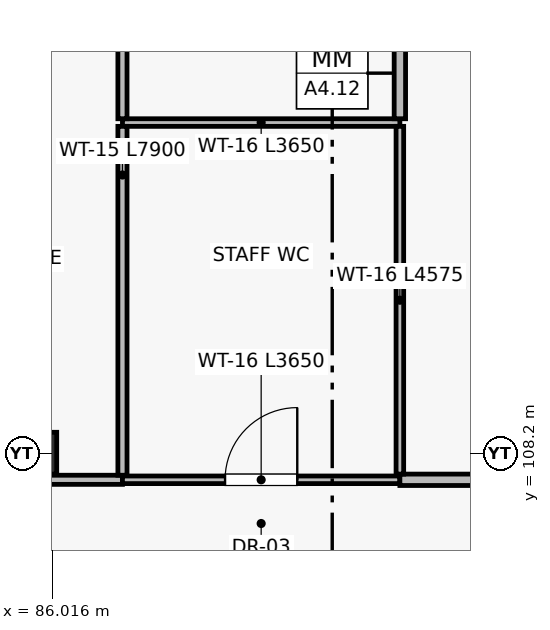
"""IFC4 building model, lengths in metres.
Left out: names, types, materials, properties, quantities, classifications, styles, units other than length and angle.
Written with IfcOpenShell. Run it as: python <this file> out.ifc"""

import sys

from ifc_helpers import new_model, si_unit, direction, frame, frame_2d, origin, origin_2d, place, context, subcontext, project, spatial, rectangle, extrude, element, fill, save


model = new_model("IFC4")
c1 = context("Model", 3, precision=1e-05, world=origin(), true_north=direction((0.0, 1.0)))
c2 = subcontext(c1, "Body", "Model", "MODEL_VIEW")
j1 = project(units=[si_unit("LENGTHUNIT", "METRE"), si_unit("PLANEANGLEUNIT", "RADIAN")], contexts=[c1])
p1 = place(None, origin())
s1 = spatial("IfcSite", under=j1, at=p1, CompositionType="ELEMENT")
p2 = place(p1, origin())
s2 = spatial("IfcBuilding", under=s1, at=p2, CompositionType="ELEMENT")
p3 = place(p2, frame((0.0, 0.0, 9.6)))
s3 = spatial("IfcBuildingStorey", under=s2, at=p3, CompositionType="ELEMENT", Elevation=9.6)
p4 = place(p3, frame((85.8, 108.2, 0.0), z_axis=(0.0, 0.0, 1.0), x_axis=(1.0, 0.0, 0.0)))
e1 = element("IfcColumn", 1, at=p4, inside=s3, PredefinedType="COLUMN", context=c2, shape_type="SweptSolid", body=[
    extrude(rectangle(XDim=0.55, YDim=0.55, at=origin_2d()), origin(), (0.0, 0.0, 1.0), 4.5),
])
p5 = place(p3, frame((83.09, 107.85, 0.0), z_axis=(0.0, 0.0, 1.0), x_axis=(1.0, 0.0, 0.0)))
e2 = element("IfcWall", 2, at=p5, inside=s3, PredefinedType="PARTITIONING", context=c2, shape_type="SweptSolid", body=[
    extrude(rectangle(XDim=3.85, YDim=0.12, at=frame_2d((1.925, 0.0))), origin(), (0.0, 0.0, 1.0), 3.74),
])
p6 = place(p5, frame((0.873, 0.0, 0.0)))
e3 = element("IfcOpeningElement", 3, at=p6, cuts=e2, PredefinedType="OPENING", context=c2, shape_type="SweptSolid", body=[
    extrude(rectangle(XDim=0.95, YDim=2.1, at=frame_2d((0.475, 1.05))), frame((0.0, 0.07, 0.0), z_axis=(0.0, -1.0, 0.0), x_axis=(1.0, 0.0, 0.0)), (0.0, 0.0, 1.0), 0.14),
])
p7 = place(p3, frame((86.94, 107.85, 0.0), z_axis=(0.0, 0.0, 1.0), x_axis=(1.0, 0.0, 0.0)))
e4 = element("IfcWall", 4, at=p7, inside=s3, PredefinedType="PARTITIONING", context=c2, shape_type="SweptSolid", body=[
    extrude(rectangle(XDim=3.65, YDim=0.1, at=frame_2d((1.825, 0.0))), origin(), (0.0, 0.0, 1.0), 3.74),
])
p8 = place(p7, frame((1.35, 0.0, 0.0)))
e5 = element("IfcOpeningElement", 5, at=p8, cuts=e4, PredefinedType="OPENING", context=c2, shape_type="SweptSolid", body=[
    extrude(rectangle(XDim=0.95, YDim=2.1, at=frame_2d((0.475, 1.05))), frame((0.0, 0.06, 0.0), z_axis=(0.0, -1.0, 0.0), x_axis=(1.0, 0.0, 0.0)), (0.0, 0.0, 1.0), 0.12),
])
p9 = place(p3, frame((86.94, 112.55, 0.0), z_axis=(0.0, 0.0, 1.0), x_axis=(1.0, 0.0, 0.0)))
e6 = element("IfcWall", 6, at=p9, inside=s3, PredefinedType="PARTITIONING", context=c2, shape_type="SweptSolid", body=[
    extrude(rectangle(XDim=3.65, YDim=0.1, at=frame_2d((1.825, 0.0))), origin(), (0.0, 0.0, 1.0), 4.24),
])
p10 = place(p3, frame((90.59, 107.85, 0.0), z_axis=(0.0, 0.0, 1.0), x_axis=(1.0, 0.0, 0.0)))
e7 = element("IfcWall", 7, at=p10, inside=s3, PredefinedType="PARTITIONING", context=c2, shape_type="SweptSolid", body=[
    extrude(rectangle(XDim=6.4, YDim=0.15, at=frame_2d((3.2, 0.0))), origin(), (0.0, 0.0, 1.0), 3.74),
])
p11 = place(p10, frame((0.96, 0.0, 0.0)))
e8 = element("IfcOpeningElement", 8, at=p11, cuts=e7, PredefinedType="OPENING", context=c2, shape_type="SweptSolid", body=[
    extrude(rectangle(XDim=1.28, YDim=2.25, at=frame_2d((0.64, 1.125))), frame((0.0, 0.085, 0.0), z_axis=(0.0, -1.0, 0.0), x_axis=(1.0, 0.0, 0.0)), (0.0, 0.0, 1.0), 0.17),
])
p12 = place(p3, frame((86.94, 107.91, 0.0), z_axis=(0.0, 0.0, 1.0), x_axis=(0.0, 1.0, 0.0)))
e9 = element("IfcWall", 9, at=p12, inside=s3, PredefinedType="PARTITIONING", context=c2, shape_type="SweptSolid", body=[
    extrude(rectangle(XDim=4.59, YDim=0.12, at=frame_2d((2.295, 0.0))), origin(), (0.0, 0.0, 1.0), 4.24),
])
p13 = place(p3, frame((86.94, 112.6, 0.0), z_axis=(0.0, 0.0, 1.0), x_axis=(0.0, 1.0, 0.0)))
e10 = element("IfcWall", 10, at=p13, inside=s3, PredefinedType="PARTITIONING", context=c2, shape_type="SweptSolid", body=[
    extrude(rectangle(XDim=3.21, YDim=0.12, at=frame_2d((1.605, 0.0))), origin(), (0.0, 0.0, 1.0), 4.24),
])
p14 = place(p3, frame((90.59, 107.925, 0.0), z_axis=(0.0, 0.0, 1.0), x_axis=(0.0, 1.0, 0.0)))
e11 = element("IfcWall", 11, at=p14, inside=s3, PredefinedType="PARTITIONING", context=c2, shape_type="SweptSolid", body=[
    extrude(rectangle(XDim=4.575, YDim=0.1, at=frame_2d((2.288, 0.0))), origin(), (0.0, 0.0, 1.0), 3.94),
])
p15 = place(p3, frame((90.59, 112.6, 0.0), z_axis=(0.0, 0.0, 1.0), x_axis=(0.0, 1.0, 0.0)))
e12 = element("IfcWall", 12, at=p15, inside=s3, PredefinedType="PARTITIONING", context=c2, shape_type="SweptSolid", body=[
    extrude(rectangle(XDim=3.21, YDim=0.15, at=frame_2d((1.605, 0.0))), origin(), (0.0, 0.0, 1.0), 3.94),
])
p16 = place(p8, origin())
e13 = element("IfcDoor", 13, at=p16, inside=s3, OperationType="SINGLE_SWING_RIGHT", PredefinedType="DOOR", context=c2, shape_type="SweptSolid", body=[
    extrude(rectangle(XDim=0.95, YDim=2.1, at=frame_2d((0.475, 1.05))), frame((0.0, 0.025, 0.0), z_axis=(0.0, -1.0, 0.0), x_axis=(1.0, 0.0, 0.0)), (0.0, 0.0, 1.0), 0.05),
])
fill(e5, e13)
save(model, sys.argv[1])
